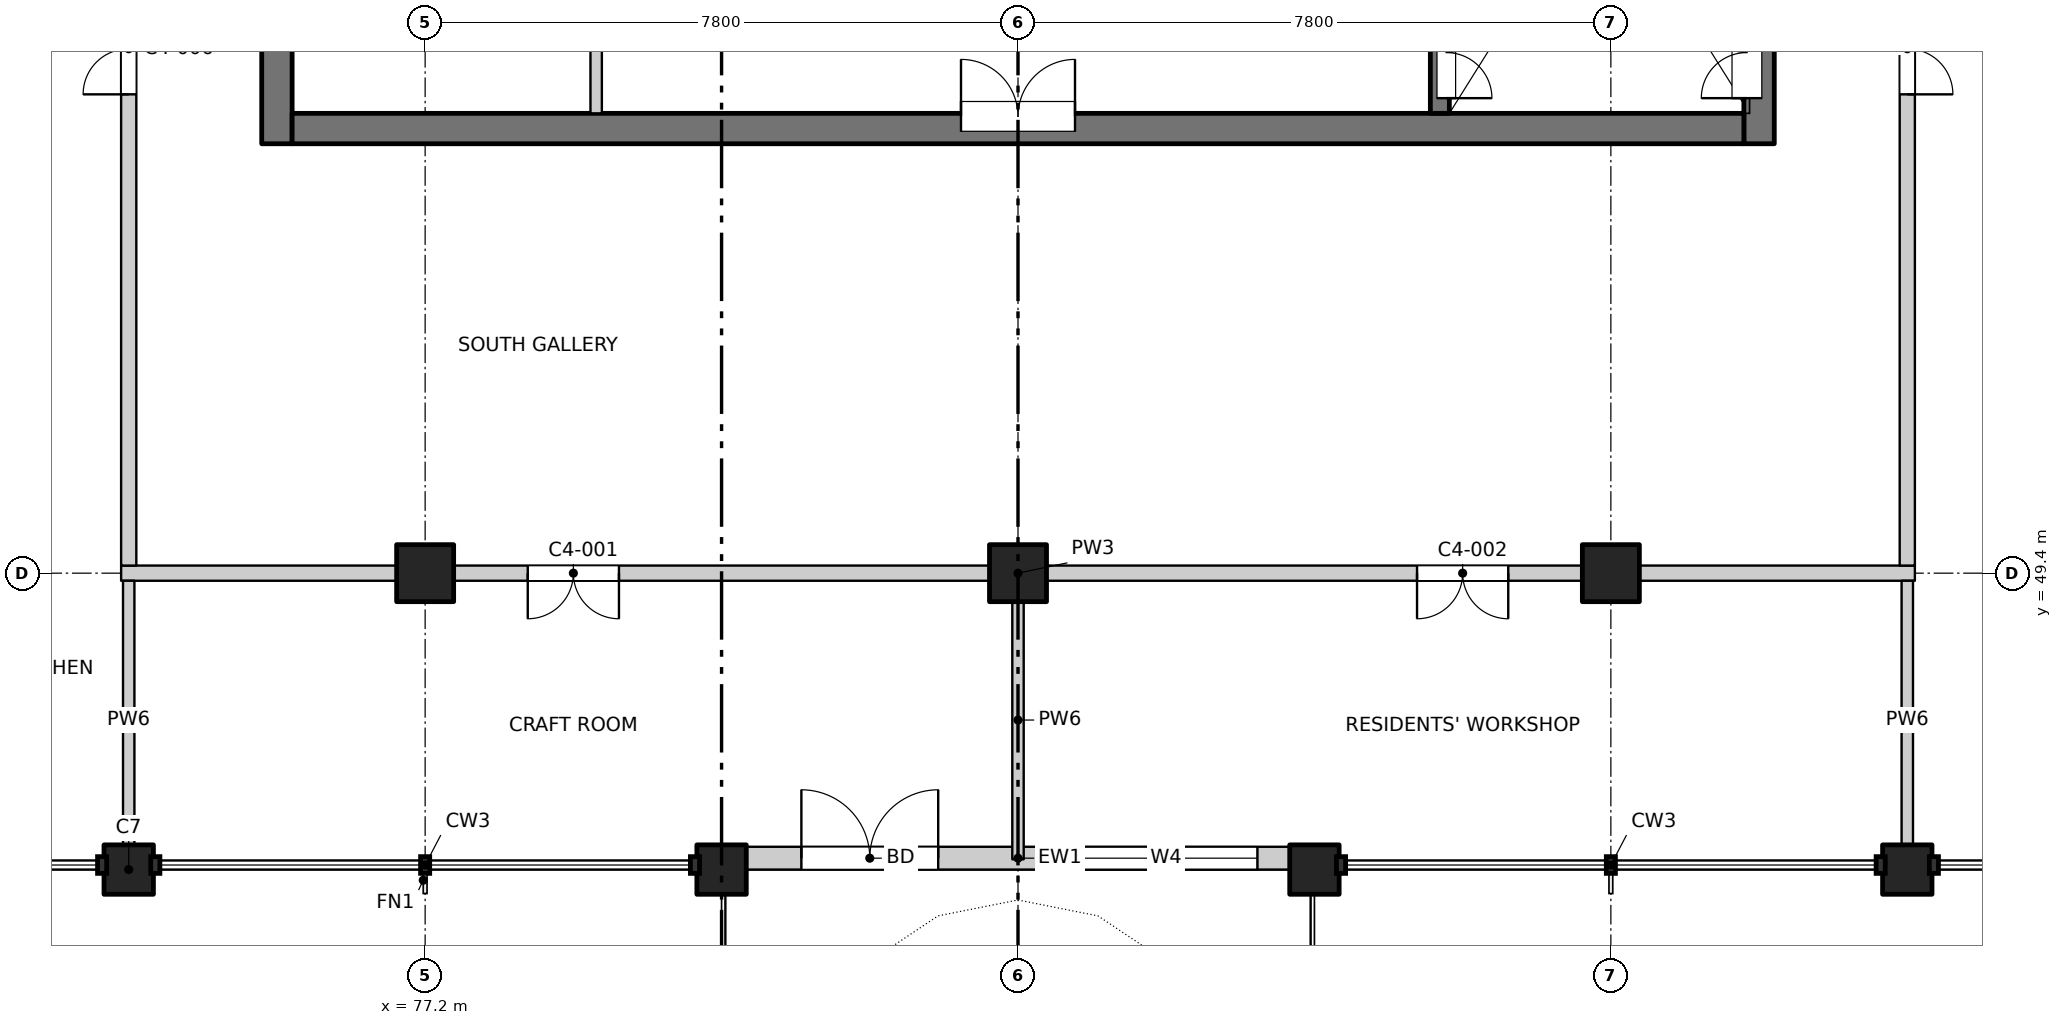
"""IFC4 building model, lengths in metres.
Left out: names, types, materials, properties, quantities, classifications, styles, units other than length and angle.
Written with IfcOpenShell. Run it as: python <this file> out.ifc"""

import sys

from ifc_helpers import new_model, si_unit, direction, frame, frame_2d, origin, origin_2d, place, context, subcontext, project, spatial, rectangle, extrude, element, fill, save


model = new_model("IFC4")
c1 = context("Model", 3, precision=1e-05, world=origin(), true_north=direction((0.0, 1.0)))
c2 = subcontext(c1, "Body", "Model", "MODEL_VIEW")
j1 = project(units=[si_unit("LENGTHUNIT", "METRE"), si_unit("PLANEANGLEUNIT", "RADIAN")], contexts=[c1])
p1 = place(None, origin())
s1 = spatial("IfcSite", under=j1, at=p1, CompositionType="ELEMENT")
p2 = place(p1, origin())
s2 = spatial("IfcBuilding", under=s1, at=p2, CompositionType="ELEMENT")
p3 = place(p2, frame((0.0, 0.0, 256.2)))
s3 = spatial("IfcBuildingStorey", under=s2, at=p3, CompositionType="ELEMENT", Elevation=256.2)
for number, where, z_axis, x_axis in (
    (1, (73.3, 45.5, -0.25), (0.0, 0.0, 1.0), (1.0, 0.0, 0.0)),
    (2, (81.1, 45.5, -0.25), (0.0, 0.0, 1.0), (1.0, 0.0, 0.0)),
    (3, (88.9, 45.5, -0.25), (0.0, 0.0, 1.0), (1.0, 0.0, 0.0)),
    (4, (96.7, 45.5, -0.25), (0.0, 0.0, 1.0), (1.0, 0.0, 0.0)),
):
    element("IfcColumn", number, at=place(p3, frame(where, z_axis=z_axis, x_axis=x_axis)), inside=s3, PredefinedType="COLUMN", context=c2, shape_type="SweptSolid", body=[
        extrude(rectangle(XDim=0.65, YDim=0.65, at=origin_2d()), origin(), (0.0, 0.0, 1.0), 3.4),
    ])
for number, where, z_axis, x_axis in (
    (5, (77.2, 49.4, -0.25), (0.0, 0.0, 1.0), (1.0, 0.0, 0.0)),
    (6, (85.0, 49.4, -0.25), (0.0, 0.0, 1.0), (1.0, 0.0, 0.0)),
    (7, (92.8, 49.4, -0.25), (0.0, 0.0, 1.0), (1.0, 0.0, 0.0)),
):
    element("IfcColumn", number, at=place(p3, frame(where, z_axis=z_axis, x_axis=x_axis)), inside=s3, PredefinedType="COLUMN", context=c2, shape_type="SweptSolid", body=[
        extrude(rectangle(XDim=0.75, YDim=0.75, at=origin_2d()), origin(), (0.0, 0.0, 1.0), 3.4),
    ])
p4 = place(p3, frame((75.25, 55.05, -0.25), z_axis=(0.0, 0.0, 1.0), x_axis=(0.0, 1.0, 0.0)))
e8 = element("IfcWall", 8, at=p4, inside=s3, PredefinedType="SOLIDWALL", context=c2, shape_type="SweptSolid", body=[
    extrude(rectangle(XDim=22.25, YDim=0.4, at=frame_2d((11.125, 0.0))), origin(), (0.0, 0.0, 1.0), 3.4),
])
p5 = place(p4, frame((7.4, 0.0, 0.25)))
e9 = element("IfcOpeningElement", 9, at=p5, cuts=e8, PredefinedType="OPENING", context=c2, shape_type="SweptSolid", body=[
    extrude(rectangle(XDim=0.9, YDim=2.1, at=frame_2d((0.45, 1.05))), frame((0.0, 0.21, 0.0), z_axis=(0.0, -1.0, 0.0), x_axis=(1.0, 0.0, 0.0)), (0.0, 0.0, 1.0), 0.42),
])
p6 = place(p4, frame((10.7, 0.0, 0.25)))
e10 = element("IfcOpeningElement", 10, at=p6, cuts=e8, PredefinedType="OPENING", context=c2, shape_type="SweptSolid", body=[
    extrude(rectangle(XDim=0.9, YDim=2.1, at=frame_2d((0.45, 1.05))), frame((0.0, 0.21, 0.0), z_axis=(0.0, -1.0, 0.0), x_axis=(1.0, 0.0, 0.0)), (0.0, 0.0, 1.0), 0.42),
])
p7 = place(p4, frame((13.7, 0.0, 0.25)))
e11 = element("IfcOpeningElement", 11, at=p7, cuts=e8, PredefinedType="OPENING", context=c2, shape_type="SweptSolid", body=[
    extrude(rectangle(XDim=0.9, YDim=2.1, at=frame_2d((0.45, 1.05))), frame((0.0, 0.21, 0.0), z_axis=(0.0, -1.0, 0.0), x_axis=(1.0, 0.0, 0.0)), (0.0, 0.0, 1.0), 0.42),
])
p8 = place(p4, frame((16.7, 0.0, 0.25)))
e12 = element("IfcOpeningElement", 12, at=p8, cuts=e8, PredefinedType="OPENING", context=c2, shape_type="SweptSolid", body=[
    extrude(rectangle(XDim=0.9, YDim=2.1, at=frame_2d((0.45, 1.05))), frame((0.0, 0.21, 0.0), z_axis=(0.0, -1.0, 0.0), x_axis=(1.0, 0.0, 0.0)), (0.0, 0.0, 1.0), 0.42),
])
p9 = place(p4, frame((20.0, 0.0, 0.25)))
e13 = element("IfcOpeningElement", 13, at=p9, cuts=e8, PredefinedType="OPENING", context=c2, shape_type="SweptSolid", body=[
    extrude(rectangle(XDim=0.9, YDim=2.1, at=frame_2d((0.45, 1.05))), frame((0.0, 0.21, 0.0), z_axis=(0.0, -1.0, 0.0), x_axis=(1.0, 0.0, 0.0)), (0.0, 0.0, 1.0), 0.42),
])
p10 = place(p3, frame((94.75, 55.05, -0.25), z_axis=(0.0, 0.0, 1.0), x_axis=(0.0, 1.0, 0.0)))
e14 = element("IfcWall", 14, at=p10, inside=s3, PredefinedType="SOLIDWALL", context=c2, shape_type="SweptSolid", body=[
    extrude(rectangle(XDim=6.9, YDim=0.4, at=frame_2d((3.45, 0.0))), origin(), (0.0, 0.0, 1.0), 3.4),
])
p11 = place(p10, frame((0.6, 0.0, 0.25)))
e15 = element("IfcOpeningElement", 15, at=p11, cuts=e14, PredefinedType="OPENING", context=c2, shape_type="SweptSolid", body=[
    extrude(rectangle(XDim=1.2, YDim=2.1, at=frame_2d((0.6, 1.05))), frame((0.0, 0.21, 0.0), z_axis=(0.0, -1.0, 0.0), x_axis=(1.0, 0.0, 0.0)), (0.0, 0.0, 1.0), 0.42),
])
p12 = place(p3, frame((75.45, 55.25, -0.25), z_axis=(0.0, 0.0, 1.0), x_axis=(1.0, 0.0, 0.0)))
e16 = element("IfcWall", 16, at=p12, inside=s3, PredefinedType="SOLIDWALL", context=c2, shape_type="SweptSolid", body=[
    extrude(rectangle(XDim=19.1, YDim=0.4, at=frame_2d((9.55, 0.0))), origin(), (0.0, 0.0, 1.0), 3.4),
])
p13 = place(p12, frame((8.8, 0.0, 0.25)))
e17 = element("IfcOpeningElement", 17, at=p13, cuts=e16, PredefinedType="OPENING", context=c2, shape_type="SweptSolid", body=[
    extrude(rectangle(XDim=1.5, YDim=2.1, at=frame_2d((0.75, 1.05))), frame((0.0, 0.21, 0.0), z_axis=(0.0, -1.0, 0.0), x_axis=(1.0, 0.0, 0.0)), (0.0, 0.0, 1.0), 0.42),
])
p14 = place(p3, frame((90.55, 55.45, -0.25), z_axis=(0.0, 0.0, 1.0), x_axis=(0.0, 1.0, 0.0)))
e18 = element("IfcWall", 18, at=p14, inside=s3, PredefinedType="SOLIDWALL", context=c2, shape_type="SweptSolid", body=[
    extrude(rectangle(XDim=6.5, YDim=0.25, at=frame_2d((3.25, 0.0))), origin(), (0.0, 0.0, 1.0), 3.4),
])
p15 = place(p14, frame((0.2, 0.0, 0.25)))
e19 = element("IfcOpeningElement", 19, at=p15, cuts=e18, PredefinedType="OPENING", context=c2, shape_type="SweptSolid", body=[
    extrude(rectangle(XDim=1.2, YDim=2.1, at=frame_2d((0.6, 1.05))), frame((0.0, 0.135, 0.0), z_axis=(0.0, -1.0, 0.0), x_axis=(1.0, 0.0, 0.0)), (0.0, 0.0, 1.0), 0.27),
])
p16 = place(p3, frame((81.425, 45.65, 0.0), z_axis=(0.0, 0.0, 1.0), x_axis=(1.0, 0.0, 0.0)))
e20 = element("IfcWall", 20, at=p16, inside=s3, PredefinedType="SOLIDWALL", context=c2, shape_type="SweptSolid", body=[
    extrude(rectangle(XDim=7.15, YDim=0.3, at=frame_2d((3.575, 0.0))), origin(), (0.0, 0.0, 1.0), 2.7),
])
p17 = place(p16, frame((0.725, 0.0, 0.0)))
e21 = element("IfcOpeningElement", 21, at=p17, cuts=e20, PredefinedType="OPENING", context=c2, shape_type="SweptSolid", body=[
    extrude(rectangle(XDim=1.8, YDim=2.4, at=frame_2d((0.9, 1.2))), frame((0.0, 0.16, 0.0), z_axis=(0.0, -1.0, 0.0), x_axis=(1.0, 0.0, 0.0)), (0.0, 0.0, 1.0), 0.32),
])
p18 = place(p16, frame((4.325, 0.0, 0.6)))
e22 = element("IfcOpeningElement", 22, at=p18, cuts=e20, PredefinedType="OPENING", context=c2, shape_type="SweptSolid", body=[
    extrude(rectangle(XDim=2.4, YDim=2.1, at=frame_2d((1.2, 1.05))), frame((0.0, 0.16, 0.0), z_axis=(0.0, -1.0, 0.0), x_axis=(1.0, 0.0, 0.0)), (0.0, 0.0, 1.0), 0.32),
])
p19 = place(p3, frame((73.2, 49.4, 0.0), z_axis=(0.0, 0.0, 1.0), x_axis=(1.0, 0.0, 0.0)))
e23 = element("IfcWall", 23, at=p19, inside=s3, PredefinedType="PARTITIONING", context=c2, shape_type="SweptSolid", body=[
    extrude(rectangle(XDim=23.6, YDim=0.2, at=frame_2d((11.8, 0.0))), origin(), (0.0, 0.0, 1.0), 3.15),
])
p20 = place(p19, frame((5.35, 0.0, 0.0)))
e24 = element("IfcOpeningElement", 24, at=p20, cuts=e23, PredefinedType="OPENING", context=c2, shape_type="SweptSolid", body=[
    extrude(rectangle(XDim=1.2, YDim=2.1, at=frame_2d((0.6, 1.05))), frame((0.0, 0.11, 0.0), z_axis=(0.0, -1.0, 0.0), x_axis=(1.0, 0.0, 0.0)), (0.0, 0.0, 1.0), 0.22),
])
p21 = place(p19, frame((17.05, 0.0, 0.0)))
e25 = element("IfcOpeningElement", 25, at=p21, cuts=e23, PredefinedType="OPENING", context=c2, shape_type="SweptSolid", body=[
    extrude(rectangle(XDim=1.2, YDim=2.1, at=frame_2d((0.6, 1.05))), frame((0.0, 0.11, 0.0), z_axis=(0.0, -1.0, 0.0), x_axis=(1.0, 0.0, 0.0)), (0.0, 0.0, 1.0), 0.22),
])
p22 = place(p3, frame((73.3, 45.635, 0.0), z_axis=(0.0, 0.0, 1.0), x_axis=(0.0, 1.0, 0.0)))
e26 = element("IfcWall", 26, at=p22, inside=s3, PredefinedType="PARTITIONING", context=c2, shape_type="SweptSolid", body=[
    extrude(rectangle(XDim=3.665, YDim=0.15, at=frame_2d((1.833, 0.0))), origin(), (0.0, 0.0, 1.0), 3.15),
])
p23 = place(p3, frame((73.3, 49.5, 0.0), z_axis=(0.0, 0.0, 1.0), x_axis=(0.0, 1.0, 0.0)))
e27 = element("IfcWall", 27, at=p23, inside=s3, PredefinedType="PARTITIONING", context=c2, shape_type="SweptSolid", body=[
    extrude(rectangle(XDim=34.865, YDim=0.2, at=frame_2d((17.433, 0.0))), origin(), (0.0, 0.0, 1.0), 3.15),
])
p24 = place(p23, frame((6.2, 0.0, 0.0)))
e28 = element("IfcOpeningElement", 28, at=p24, cuts=e27, PredefinedType="OPENING", context=c2, shape_type="SweptSolid", body=[
    extrude(rectangle(XDim=1.2, YDim=2.1, at=frame_2d((0.6, 1.05))), frame((0.0, 0.11, 0.0), z_axis=(0.0, -1.0, 0.0), x_axis=(1.0, 0.0, 0.0)), (0.0, 0.0, 1.0), 0.22),
])
p25 = place(p23, frame((9.05, 0.0, 0.0)))
e29 = element("IfcOpeningElement", 29, at=p25, cuts=e27, PredefinedType="OPENING", context=c2, shape_type="SweptSolid", body=[
    extrude(rectangle(XDim=1.2, YDim=2.1, at=frame_2d((0.6, 1.05))), frame((0.0, 0.11, 0.0), z_axis=(0.0, -1.0, 0.0), x_axis=(1.0, 0.0, 0.0)), (0.0, 0.0, 1.0), 0.22),
])
p26 = place(p23, frame((18.7, 0.0, 0.0)))
e30 = element("IfcOpeningElement", 30, at=p26, cuts=e27, PredefinedType="OPENING", context=c2, shape_type="SweptSolid", body=[
    extrude(rectangle(XDim=1.2, YDim=2.1, at=frame_2d((0.6, 1.05))), frame((0.0, 0.11, 0.0), z_axis=(0.0, -1.0, 0.0), x_axis=(1.0, 0.0, 0.0)), (0.0, 0.0, 1.0), 0.22),
])
p27 = place(p23, frame((28.55, 0.0, 0.0)))
e31 = element("IfcOpeningElement", 31, at=p27, cuts=e27, PredefinedType="OPENING", context=c2, shape_type="SweptSolid", body=[
    extrude(rectangle(XDim=1.2, YDim=2.1, at=frame_2d((0.6, 1.05))), frame((0.0, 0.11, 0.0), z_axis=(0.0, -1.0, 0.0), x_axis=(1.0, 0.0, 0.0)), (0.0, 0.0, 1.0), 0.22),
])
p28 = place(p23, frame((31.825, 0.0, 0.0)))
e32 = element("IfcOpeningElement", 32, at=p28, cuts=e27, PredefinedType="OPENING", context=c2, shape_type="SweptSolid", body=[
    extrude(rectangle(XDim=1.2, YDim=2.1, at=frame_2d((0.6, 1.05))), frame((0.0, 0.11, 0.0), z_axis=(0.0, -1.0, 0.0), x_axis=(1.0, 0.0, 0.0)), (0.0, 0.0, 1.0), 0.22),
])
p29 = place(p23, frame((33.65, 0.0, 0.0)))
e33 = element("IfcOpeningElement", 33, at=p29, cuts=e27, PredefinedType="OPENING", context=c2, shape_type="SweptSolid", body=[
    extrude(rectangle(XDim=0.9, YDim=2.1, at=frame_2d((0.45, 1.05))), frame((0.0, 0.11, 0.0), z_axis=(0.0, -1.0, 0.0), x_axis=(1.0, 0.0, 0.0)), (0.0, 0.0, 1.0), 0.22),
])
p30 = place(p3, frame((79.45, 55.45, 0.0), z_axis=(0.0, 0.0, 1.0), x_axis=(0.0, 1.0, 0.0)))
e34 = element("IfcWall", 34, at=p30, inside=s3, PredefinedType="PARTITIONING", context=c2, shape_type="SweptSolid", body=[
    extrude(rectangle(XDim=5.45, YDim=0.15, at=frame_2d((2.725, 0.0))), origin(), (0.0, 0.0, 1.0), 3.15),
])
p31 = place(p30, frame((2.25, 0.0, 0.0)))
e35 = element("IfcOpeningElement", 35, at=p31, cuts=e34, PredefinedType="OPENING", context=c2, shape_type="SweptSolid", body=[
    extrude(rectangle(XDim=0.9, YDim=2.1, at=frame_2d((0.45, 1.05))), frame((0.0, 0.085, 0.0), z_axis=(0.0, -1.0, 0.0), x_axis=(1.0, 0.0, 0.0)), (0.0, 0.0, 1.0), 0.17),
])
for number, where, z_axis, x_axis in (
    (36, (85.0, 45.635, 0.0), (0.0, 0.0, 1.0), (0.0, 1.0, 0.0)),
    (37, (96.7, 45.635, 0.0), (0.0, 0.0, 1.0), (0.0, 1.0, 0.0)),
):
    element("IfcWall", number, at=place(p3, frame(where, z_axis=z_axis, x_axis=x_axis)), inside=s3, PredefinedType="PARTITIONING", context=c2, shape_type="SweptSolid", body=[
        extrude(rectangle(XDim=3.665, YDim=0.15, at=frame_2d((1.833, 0.0))), origin(), (0.0, 0.0, 1.0), 3.15),
    ])
p32 = place(p3, frame((96.7, 49.5, 0.0), z_axis=(0.0, 0.0, 1.0), x_axis=(0.0, 1.0, 0.0)))
e38 = element("IfcWall", 38, at=p32, inside=s3, PredefinedType="PARTITIONING", context=c2, shape_type="SweptSolid", body=[
    extrude(rectangle(XDim=34.865, YDim=0.2, at=frame_2d((17.433, 0.0))), origin(), (0.0, 0.0, 1.0), 3.15),
])
p33 = place(p32, frame((6.2, 0.0, 0.0)))
e39 = element("IfcOpeningElement", 39, at=p33, cuts=e38, PredefinedType="OPENING", context=c2, shape_type="SweptSolid", body=[
    extrude(rectangle(XDim=1.2, YDim=2.1, at=frame_2d((0.6, 1.05))), frame((0.0, 0.11, 0.0), z_axis=(0.0, -1.0, 0.0), x_axis=(1.0, 0.0, 0.0)), (0.0, 0.0, 1.0), 0.22),
])
p34 = place(p32, frame((12.95, 0.0, 0.0)))
e40 = element("IfcOpeningElement", 40, at=p34, cuts=e38, PredefinedType="OPENING", context=c2, shape_type="SweptSolid", body=[
    extrude(rectangle(XDim=1.2, YDim=2.1, at=frame_2d((0.6, 1.05))), frame((0.0, 0.11, 0.0), z_axis=(0.0, -1.0, 0.0), x_axis=(1.0, 0.0, 0.0)), (0.0, 0.0, 1.0), 0.22),
])
p35 = place(p32, frame((28.55, 0.0, 0.0)))
e41 = element("IfcOpeningElement", 41, at=p35, cuts=e38, PredefinedType="OPENING", context=c2, shape_type="SweptSolid", body=[
    extrude(rectangle(XDim=1.2, YDim=2.1, at=frame_2d((0.6, 1.05))), frame((0.0, 0.11, 0.0), z_axis=(0.0, -1.0, 0.0), x_axis=(1.0, 0.0, 0.0)), (0.0, 0.0, 1.0), 0.22),
])
p36 = place(p32, frame((31.825, 0.0, 0.0)))
e42 = element("IfcOpeningElement", 42, at=p36, cuts=e38, PredefinedType="OPENING", context=c2, shape_type="SweptSolid", body=[
    extrude(rectangle(XDim=1.2, YDim=2.1, at=frame_2d((0.6, 1.05))), frame((0.0, 0.11, 0.0), z_axis=(0.0, -1.0, 0.0), x_axis=(1.0, 0.0, 0.0)), (0.0, 0.0, 1.0), 0.22),
])
p37 = place(p32, frame((33.65, 0.0, 0.0)))
e43 = element("IfcOpeningElement", 43, at=p37, cuts=e38, PredefinedType="OPENING", context=c2, shape_type="SweptSolid", body=[
    extrude(rectangle(XDim=0.9, YDim=2.1, at=frame_2d((0.45, 1.05))), frame((0.0, 0.11, 0.0), z_axis=(0.0, -1.0, 0.0), x_axis=(1.0, 0.0, 0.0)), (0.0, 0.0, 1.0), 0.22),
])
p38 = place(p17, origin())
e44 = element("IfcDoor", 44, at=p38, inside=s3, OperationType="DOUBLE_DOOR_SINGLE_SWING", PredefinedType="DOOR", context=c2, shape_type="SweptSolid", body=[
    extrude(rectangle(XDim=1.8, YDim=2.4, at=frame_2d((0.9, 1.2))), frame((0.0, 0.025, 0.0), z_axis=(0.0, -1.0, 0.0), x_axis=(1.0, 0.0, 0.0)), (0.0, 0.0, 1.0), 0.05),
])
fill(e21, e44)
p39 = place(p18, origin())
e45 = element("IfcWindow", 45, at=p39, inside=s3, PartitioningType="SINGLE_PANEL", PredefinedType="WINDOW", context=c2, shape_type="SweptSolid", body=[
    extrude(rectangle(XDim=2.4, YDim=2.1, at=frame_2d((1.2, 1.05))), frame((0.0, 0.03, 0.0), z_axis=(0.0, -1.0, 0.0), x_axis=(1.0, 0.0, 0.0)), (0.0, 0.0, 1.0), 0.06),
])
fill(e22, e45)
p40 = place(p20, origin())
e46 = element("IfcDoor", 46, at=p40, inside=s3, OperationType="DOUBLE_DOOR_SINGLE_SWING", PredefinedType="DOOR", context=c2, shape_type="SweptSolid", body=[
    extrude(rectangle(XDim=1.2, YDim=2.1, at=frame_2d((0.6, 1.05))), frame((0.0, 0.025, 0.0), z_axis=(0.0, -1.0, 0.0), x_axis=(1.0, 0.0, 0.0)), (0.0, 0.0, 1.0), 0.05),
])
fill(e24, e46)
p41 = place(p21, origin())
e47 = element("IfcDoor", 47, at=p41, inside=s3, OperationType="DOUBLE_DOOR_SINGLE_SWING", PredefinedType="DOOR", context=c2, shape_type="SweptSolid", body=[
    extrude(rectangle(XDim=1.2, YDim=2.1, at=frame_2d((0.6, 1.05))), frame((0.0, 0.025, 0.0), z_axis=(0.0, -1.0, 0.0), x_axis=(1.0, 0.0, 0.0)), (0.0, 0.0, 1.0), 0.05),
])
fill(e25, e47)
p42 = place(p13, origin())
e48 = element("IfcDoor", 48, at=p42, inside=s3, OperationType="DOUBLE_DOOR_SINGLE_SWING", PredefinedType="DOOR", context=c2, shape_type="SweptSolid", body=[
    extrude(rectangle(XDim=1.5, YDim=2.1, at=frame_2d((0.75, 1.05))), frame((0.0, 0.185, 0.0), z_axis=(0.0, -1.0, 0.0), x_axis=(1.0, 0.0, 0.0)), (0.0, 0.0, 1.0), 0.05),
])
fill(e17, e48)
p43 = place(p15, origin())
e49 = element("IfcDoor", 49, at=p43, inside=s3, OperationType="DOUBLE_DOOR_SINGLE_SWING", PredefinedType="DOOR", context=c2, shape_type="SweptSolid", body=[
    extrude(rectangle(XDim=1.2, YDim=2.1, at=frame_2d((0.6, 1.05))), frame((0.0, -0.06, 0.0), z_axis=(0.0, -1.0, 0.0), x_axis=(1.0, 0.0, 0.0)), (0.0, 0.0, 1.0), 0.05),
])
fill(e19, e49)
p44 = place(p11, origin())
e50 = element("IfcDoor", 50, at=p44, inside=s3, OperationType="DOUBLE_DOOR_SINGLE_SWING", PredefinedType="DOOR", context=c2, shape_type="SweptSolid", body=[
    extrude(rectangle(XDim=1.2, YDim=2.1, at=frame_2d((0.6, 1.05))), frame((0.0, 0.185, 0.0), z_axis=(0.0, -1.0, 0.0), x_axis=(1.0, 0.0, 0.0)), (0.0, 0.0, 1.0), 0.05),
])
fill(e15, e50)
p45 = place(p24, origin())
e51 = element("IfcDoor", 51, at=p45, inside=s3, OperationType="DOUBLE_DOOR_SINGLE_SWING", PredefinedType="DOOR", context=c2, shape_type="SweptSolid", body=[
    extrude(rectangle(XDim=1.2, YDim=2.1, at=frame_2d((0.6, 1.05))), frame((0.0, 0.025, 0.0), z_axis=(0.0, -1.0, 0.0), x_axis=(1.0, 0.0, 0.0)), (0.0, 0.0, 1.0), 0.05),
])
fill(e28, e51)
p46 = place(p33, origin())
e52 = element("IfcDoor", 52, at=p46, inside=s3, OperationType="DOUBLE_DOOR_SINGLE_SWING", PredefinedType="DOOR", context=c2, shape_type="SweptSolid", body=[
    extrude(rectangle(XDim=1.2, YDim=2.1, at=frame_2d((0.6, 1.05))), frame((0.0, 0.025, 0.0), z_axis=(0.0, -1.0, 0.0), x_axis=(1.0, 0.0, 0.0)), (0.0, 0.0, 1.0), 0.05),
])
fill(e39, e52)
save(model, sys.argv[1])
